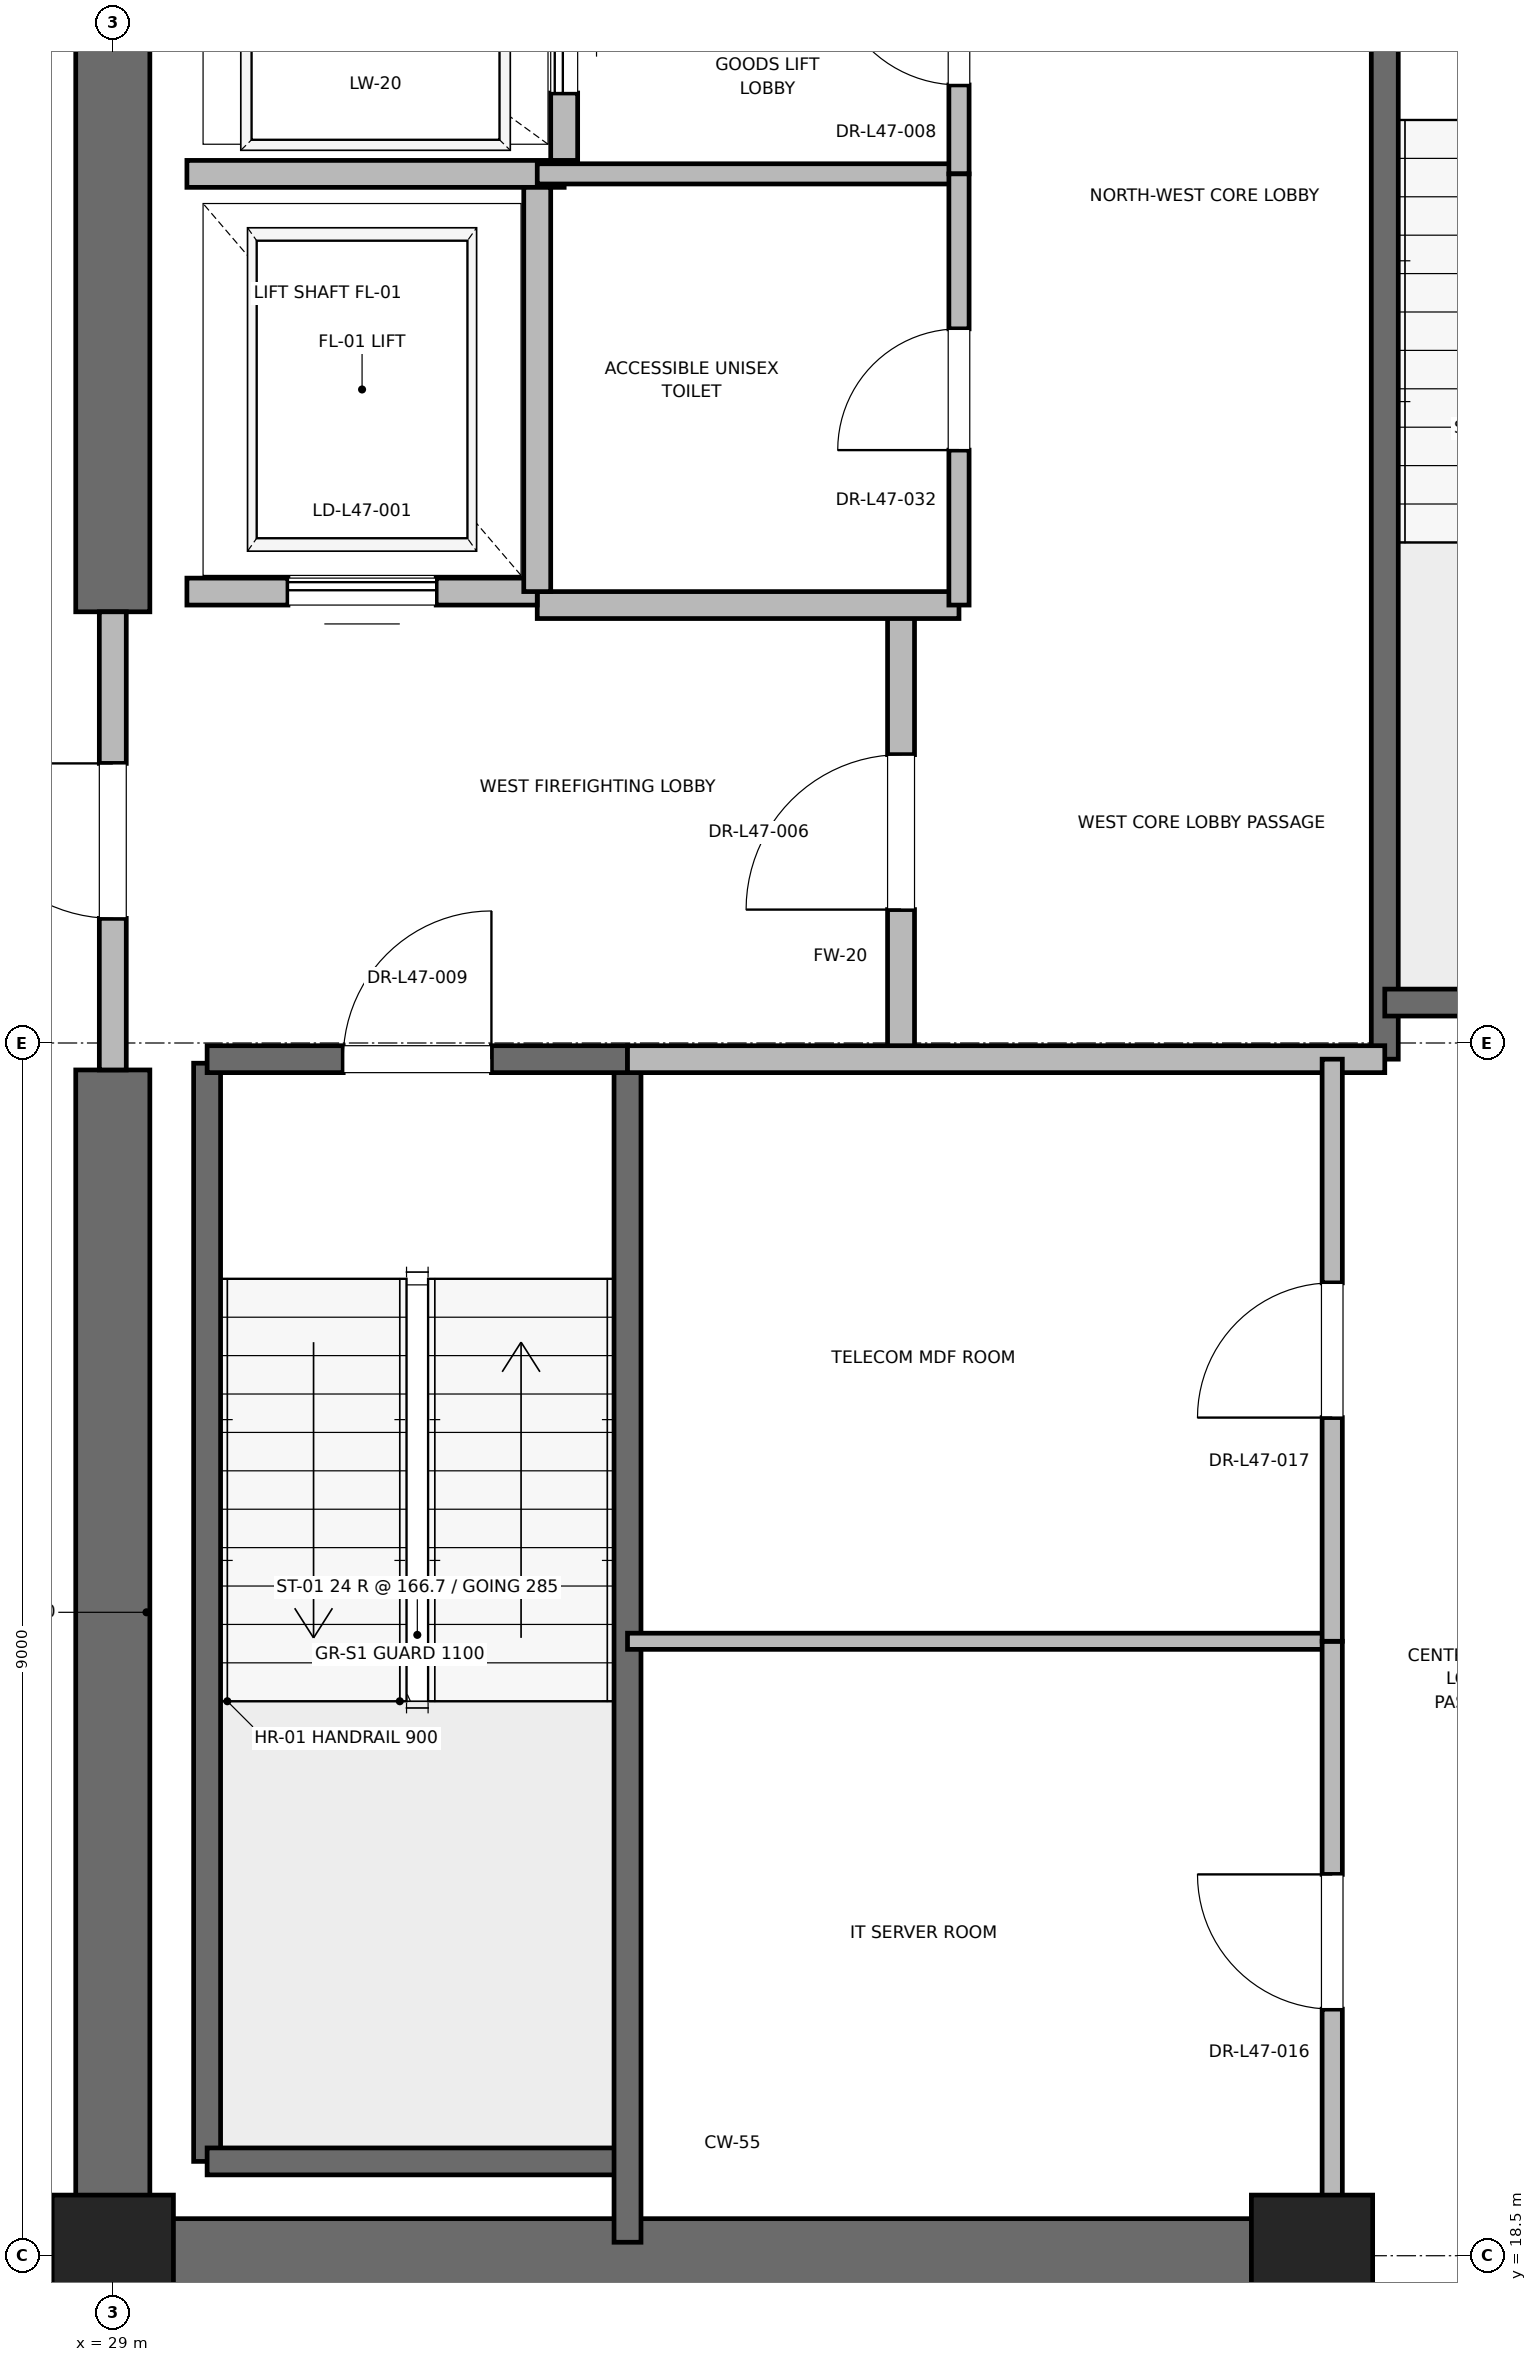
"""IFC4 building model, lengths in metres.
Left out: names, types, materials, properties, quantities, classifications, styles, units other than length and angle.
Written with IfcOpenShell. Run it as: python <this file> out.ifc"""

import sys

from ifc_helpers import new_model, si_unit, direction, frame, frame_2d, origin, origin_2d, place, context, subcontext, project, spatial, rectangle, extrude, element, fill, save


model = new_model("IFC4")
c1 = context("Model", 3, precision=1e-05, world=origin(), true_north=direction((0.0, 1.0)))
c2 = subcontext(c1, "Body", "Model", "MODEL_VIEW")
j1 = project(units=[si_unit("LENGTHUNIT", "METRE"), si_unit("PLANEANGLEUNIT", "RADIAN")], contexts=[c1])
p1 = place(None, origin())
s1 = spatial("IfcSite", under=j1, at=p1, CompositionType="ELEMENT")
p2 = place(p1, origin())
s2 = spatial("IfcBuilding", under=s1, at=p2, CompositionType="ELEMENT")
p3 = place(p2, frame((0.0, 0.0, 205.2)))
s3 = spatial("IfcBuildingStorey", under=s2, at=p3, CompositionType="ELEMENT", Elevation=205.2)
for number, where, z_axis, x_axis in (
    (1, (29.0, 18.5, 0.0), (0.0, 0.0, 1.0), (1.0, 0.0, 0.0)),
    (2, (37.9, 18.5, 0.0), (0.0, 0.0, 1.0), (1.0, 0.0, 0.0)),
):
    element("IfcColumn", number, at=place(p3, frame(where, z_axis=z_axis, x_axis=x_axis)), inside=s3, PredefinedType="PILASTER", context=c2, shape_type="SweptSolid", body=[
        extrude(rectangle(XDim=0.9, YDim=0.9, at=origin_2d()), origin(), (0.0, 0.0, 1.0), 4.0),
    ])
p4 = place(p3, frame((29.0, 18.5, 0.0), z_axis=(0.0, 0.0, 1.0), x_axis=(1.0, 0.0, 0.0)))
e3 = element("IfcWall", 3, at=p4, inside=s3, PredefinedType="SHEAR", context=c2, shape_type="SweptSolid", body=[
    extrude(rectangle(XDim=9.2, YDim=0.55, at=frame_2d((4.6, 0.0))), origin(), (0.0, 0.0, 1.0), 3.775),
])
p5 = place(p3, frame((29.0, 18.5, 0.0), z_axis=(0.0, 0.0, 1.0), x_axis=(0.0, 1.0, 0.0)))
e4 = element("IfcWall", 4, at=p5, inside=s3, PredefinedType="SHEAR", context=c2, shape_type="SweptSolid", body=[
    extrude(rectangle(XDim=8.8, YDim=0.55, at=frame_2d((4.4, 0.0))), origin(), (0.0, 0.0, 1.0), 3.775),
])
p6 = place(p3, frame((29.0, 30.7, 0.0), z_axis=(0.0, 0.0, 1.0), x_axis=(0.0, 1.0, 0.0)))
e5 = element("IfcWall", 5, at=p6, inside=s3, PredefinedType="SHEAR", context=c2, shape_type="SweptSolid", body=[
    extrude(rectangle(XDim=5.8, YDim=0.55, at=frame_2d((2.9, 0.0))), origin(), (0.0, 0.0, 1.0), 3.775),
])
p7 = place(p3, frame((29.7, 19.2, 0.0), z_axis=(0.0, 0.0, 1.0), x_axis=(0.0, 1.0, 0.0)))
e6 = element("IfcWall", 6, at=p7, inside=s3, PredefinedType="SOLIDWALL", context=c2, shape_type="SweptSolid", body=[
    extrude(rectangle(XDim=8.15, YDim=0.2, at=frame_2d((4.075, 0.0))), origin(), (0.0, 0.0, 1.0), 3.775),
])
p8 = place(p3, frame((29.7, 19.2, 0.0), z_axis=(0.0, 0.0, 1.0), x_axis=(1.0, 0.0, 0.0)))
e7 = element("IfcWall", 7, at=p8, inside=s3, PredefinedType="SOLIDWALL", context=c2, shape_type="SweptSolid", body=[
    extrude(rectangle(XDim=3.12, YDim=0.2, at=frame_2d((1.56, 0.0))), origin(), (0.0, 0.0, 1.0), 3.775),
])
p9 = place(p3, frame((32.82, 18.6, 0.0), z_axis=(0.0, 0.0, 1.0), x_axis=(0.0, 1.0, 0.0)))
e8 = element("IfcWall", 8, at=p9, inside=s3, PredefinedType="SOLIDWALL", context=c2, shape_type="SweptSolid", body=[
    extrude(rectangle(XDim=8.78, YDim=0.2, at=frame_2d((4.39, 0.0))), origin(), (0.0, 0.0, 1.0), 3.775),
])
p10 = place(p3, frame((29.7, 27.38, 0.0), z_axis=(0.0, 0.0, 1.0), x_axis=(1.0, 0.0, 0.0)))
e9 = element("IfcWall", 9, at=p10, inside=s3, PredefinedType="SOLIDWALL", context=c2, shape_type="SweptSolid", body=[
    extrude(rectangle(XDim=3.12, YDim=0.2, at=frame_2d((1.56, 0.0))), origin(), (0.0, 0.0, 1.0), 3.775),
])
p11 = place(p10, frame((1.01, 0.0, 0.0)))
e10 = element("IfcOpeningElement", 10, at=p11, cuts=e9, PredefinedType="OPENING", context=c2, shape_type="SweptSolid", body=[
    extrude(rectangle(XDim=1.1, YDim=2.15, at=frame_2d((0.55, 1.075))), frame((0.0, 0.1, 0.0), z_axis=(0.0, -1.0, 0.0), x_axis=(1.0, 0.0, 0.0)), (0.0, 0.0, 1.0), 0.2),
])
p12 = place(p3, frame((38.44, 27.38, 0.0), z_axis=(0.0, 0.0, 1.0), x_axis=(0.0, 1.0, 0.0)))
e11 = element("IfcWall", 11, at=p12, inside=s3, PredefinedType="SOLIDWALL", context=c2, shape_type="SweptSolid", body=[
    extrude(rectangle(XDim=8.87, YDim=0.2, at=frame_2d((4.435, 0.0))), origin(), (0.0, 0.0, 1.0), 3.775),
])
p13 = place(p3, frame((38.44, 27.8, 0.0), z_axis=(0.0, 0.0, 1.0), x_axis=(1.0, 0.0, 0.0)))
e12 = element("IfcWall", 12, at=p13, inside=s3, PredefinedType="SOLIDWALL", context=c2, shape_type="SweptSolid", body=[
    extrude(rectangle(XDim=3.32, YDim=0.2, at=frame_2d((1.66, 0.0))), origin(), (0.0, 0.0, 1.0), 3.775),
])
p14 = place(p3, frame((34.85, 27.38, 0.0), z_axis=(0.0, 0.0, 1.0), x_axis=(0.0, 1.0, 0.0)))
e13 = element("IfcWall", 13, at=p14, inside=s3, PredefinedType="PARTITIONING", context=c2, shape_type="SweptSolid", body=[
    extrude(rectangle(XDim=3.37, YDim=0.2, at=frame_2d((1.685, 0.0))), origin(), (0.0, 0.0, 1.0), 3.775),
])
p15 = place(p14, frame((1.11, 0.0, 0.0)))
e14 = element("IfcOpeningElement", 14, at=p15, cuts=e13, PredefinedType="OPENING", context=c2, shape_type="SweptSolid", body=[
    extrude(rectangle(XDim=1.15, YDim=2.2, at=frame_2d((0.575, 1.1))), frame((0.0, 0.1, 0.0), z_axis=(0.0, -1.0, 0.0), x_axis=(1.0, 0.0, 0.0)), (0.0, 0.0, 1.0), 0.2),
])
p16 = place(p3, frame((29.0, 27.3, 0.0), z_axis=(0.0, 0.0, 1.0), x_axis=(0.0, 1.0, 0.0)))
e15 = element("IfcWall", 15, at=p16, inside=s3, PredefinedType="PARTITIONING", context=c2, shape_type="SweptSolid", body=[
    extrude(rectangle(XDim=3.4, YDim=0.2, at=frame_2d((1.7, 0.0))), origin(), (0.0, 0.0, 1.0), 2.755),
])
p17 = place(p16, frame((1.125, 0.0, 0.0)))
e16 = element("IfcOpeningElement", 16, at=p17, cuts=e15, PredefinedType="OPENING", context=c2, shape_type="SweptSolid", body=[
    extrude(rectangle(XDim=1.15, YDim=2.2, at=frame_2d((0.575, 1.1))), frame((0.0, 0.1, 0.0), z_axis=(0.0, -1.0, 0.0), x_axis=(1.0, 0.0, 0.0)), (0.0, 0.0, 1.0), 0.2),
])
p18 = place(p3, frame((32.82, 27.38, 0.0), z_axis=(0.0, 0.0, 1.0), x_axis=(1.0, 0.0, 0.0)))
e17 = element("IfcWall", 17, at=p18, inside=s3, PredefinedType="PARTITIONING", context=c2, shape_type="SweptSolid", body=[
    extrude(rectangle(XDim=5.62, YDim=0.2, at=frame_2d((2.81, 0.0))), origin(), (0.0, 0.0, 1.0), 3.775),
])
p19 = place(p3, frame((32.15, 30.75, 0.0), z_axis=(0.0, 0.0, 1.0), x_axis=(1.0, 0.0, 0.0)))
e18 = element("IfcWall", 18, at=p19, inside=s3, PredefinedType="PARTITIONING", context=c2, shape_type="SweptSolid", body=[
    extrude(rectangle(XDim=3.13, YDim=0.2, at=frame_2d((1.565, 0.0))), origin(), (0.0, 0.0, 1.0), 3.775),
])
p20 = place(p3, frame((29.55, 30.85, 0.0), z_axis=(0.0, 0.0, 1.0), x_axis=(1.0, 0.0, 0.0)))
e19 = element("IfcWall", 19, at=p20, inside=s3, PredefinedType="SOLIDWALL", context=c2, shape_type="SweptSolid", body=[
    extrude(rectangle(XDim=2.6, YDim=0.2, at=frame_2d((1.3, 0.0))), origin(), (0.0, 0.0, 1.0), 2.755),
])
p21 = place(p20, frame((0.75, 0.0, 0.0)))
e20 = element("IfcOpeningElement", 20, at=p21, cuts=e19, PredefinedType="OPENING", context=c2, shape_type="SweptSolid", body=[
    extrude(rectangle(XDim=1.1, YDim=2.2, at=frame_2d((0.55, 1.1))), frame((0.0, 0.1, 0.0), z_axis=(0.0, -1.0, 0.0), x_axis=(1.0, 0.0, 0.0)), (0.0, 0.0, 1.0), 0.2),
])
p22 = place(p3, frame((29.55, 33.95, 0.0), z_axis=(0.0, 0.0, 1.0), x_axis=(1.0, 0.0, 0.0)))
e21 = element("IfcWall", 21, at=p22, inside=s3, PredefinedType="SOLIDWALL", context=c2, shape_type="SweptSolid", body=[
    extrude(rectangle(XDim=2.8, YDim=0.2, at=frame_2d((1.4, 0.0))), origin(), (0.0, 0.0, 1.0), 3.775),
])
p23 = place(p3, frame((32.15, 30.85, 0.0), z_axis=(0.0, 0.0, 1.0), x_axis=(0.0, 1.0, 0.0)))
e22 = element("IfcWall", 22, at=p23, inside=s3, PredefinedType="SOLIDWALL", context=c2, shape_type="SweptSolid", body=[
    extrude(rectangle(XDim=3.0, YDim=0.2, at=frame_2d((1.5, 0.0))), origin(), (0.0, 0.0, 1.0), 3.775),
])
p24 = place(p3, frame((32.35, 34.05, 0.0), z_axis=(0.0, 0.0, 1.0), x_axis=(0.0, 1.0, 0.0)))
e23 = element("IfcWall", 23, at=p24, inside=s3, PredefinedType="SOLIDWALL", context=c2, shape_type="SweptSolid", body=[
    extrude(rectangle(XDim=2.1, YDim=0.2, at=frame_2d((1.05, 0.0))), origin(), (0.0, 0.0, 1.0), 3.775),
])
p25 = place(p24, frame((0.5, 0.0, 0.0)))
e24 = element("IfcOpeningElement", 24, at=p25, cuts=e23, PredefinedType="OPENING", context=c2, shape_type="SweptSolid", body=[
    extrude(rectangle(XDim=1.1, YDim=2.2, at=frame_2d((0.55, 1.1))), frame((0.0, 0.1, 0.0), z_axis=(0.0, -1.0, 0.0), x_axis=(1.0, 0.0, 0.0)), (0.0, 0.0, 1.0), 0.2),
])
p26 = place(p3, frame((32.15, 33.95, 0.0), z_axis=(0.0, 0.0, 1.0), x_axis=(1.0, 0.0, 0.0)))
e25 = element("IfcWall", 25, at=p26, inside=s3, PredefinedType="PARTITIONING", context=c2, shape_type="SweptSolid", body=[
    extrude(rectangle(XDim=3.13, YDim=0.15, at=frame_2d((1.565, 0.0))), origin(), (0.0, 0.0, 1.0), 2.85),
])
p27 = place(p3, frame((35.28, 33.95, 0.0), z_axis=(0.0, 0.0, 1.0), x_axis=(0.0, 1.0, 0.0)))
e26 = element("IfcWall", 26, at=p27, inside=s3, PredefinedType="PARTITIONING", context=c2, shape_type="SweptSolid", body=[
    extrude(rectangle(XDim=2.27, YDim=0.15, at=frame_2d((1.135, 0.0))), origin(), (0.0, 0.0, 1.0), 2.755),
])
p28 = place(p27, frame((0.66, 0.0, 0.0)))
e27 = element("IfcOpeningElement", 27, at=p28, cuts=e26, PredefinedType="OPENING", context=c2, shape_type="SweptSolid", body=[
    extrude(rectangle(XDim=0.95, YDim=2.15, at=frame_2d((0.475, 1.075))), frame((0.0, 0.075, 0.0), z_axis=(0.0, -1.0, 0.0), x_axis=(1.0, 0.0, 0.0)), (0.0, 0.0, 1.0), 0.15),
])
p29 = place(p3, frame((35.28, 30.75, 0.0), z_axis=(0.0, 0.0, 1.0), x_axis=(0.0, 1.0, 0.0)))
e28 = element("IfcWall", 28, at=p29, inside=s3, PredefinedType="PARTITIONING", context=c2, shape_type="SweptSolid", body=[
    extrude(rectangle(XDim=3.2, YDim=0.15, at=frame_2d((1.6, 0.0))), origin(), (0.0, 0.0, 1.0), 2.85),
])
p30 = place(p29, frame((1.15, 0.0, 0.0)))
e29 = element("IfcOpeningElement", 29, at=p30, cuts=e28, PredefinedType="OPENING", context=c2, shape_type="SweptSolid", body=[
    extrude(rectangle(XDim=0.9, YDim=2.1, at=frame_2d((0.45, 1.05))), frame((0.0, 0.075, 0.0), z_axis=(0.0, -1.0, 0.0), x_axis=(1.0, 0.0, 0.0)), (0.0, 0.0, 1.0), 0.15),
])
p31 = place(p3, frame((32.82, 23.06, 0.0), z_axis=(0.0, 0.0, 1.0), x_axis=(1.0, 0.0, 0.0)))
e30 = element("IfcWall", 30, at=p31, inside=s3, PredefinedType="PARTITIONING", context=c2, shape_type="SweptSolid", body=[
    extrude(rectangle(XDim=5.23, YDim=0.12, at=frame_2d((2.615, 0.0))), origin(), (0.0, 0.0, 1.0), 2.85),
])
p32 = place(p3, frame((38.05, 18.6, 0.0), z_axis=(0.0, 0.0, 1.0), x_axis=(0.0, 1.0, 0.0)))
e31 = element("IfcWall", 31, at=p32, inside=s3, PredefinedType="PARTITIONING", context=c2, shape_type="SweptSolid", body=[
    extrude(rectangle(XDim=4.46, YDim=0.15, at=frame_2d((2.23, 0.0))), origin(), (0.0, 0.0, 1.0), 2.755),
])
p33 = place(p32, frame((1.73, 0.0, 0.0)))
e32 = element("IfcOpeningElement", 32, at=p33, cuts=e31, PredefinedType="OPENING", context=c2, shape_type="SweptSolid", body=[
    extrude(rectangle(XDim=1.0, YDim=2.15, at=frame_2d((0.5, 1.075))), frame((0.0, 0.075, 0.0), z_axis=(0.0, -1.0, 0.0), x_axis=(1.0, 0.0, 0.0)), (0.0, 0.0, 1.0), 0.15),
])
p34 = place(p3, frame((38.05, 23.06, 0.0), z_axis=(0.0, 0.0, 1.0), x_axis=(0.0, 1.0, 0.0)))
e33 = element("IfcWall", 33, at=p34, inside=s3, PredefinedType="PARTITIONING", context=c2, shape_type="SweptSolid", body=[
    extrude(rectangle(XDim=4.32, YDim=0.15, at=frame_2d((2.16, 0.0))), origin(), (0.0, 0.0, 1.0), 2.85),
])
p35 = place(p34, frame((1.66, 0.0, 0.0)))
e34 = element("IfcOpeningElement", 34, at=p35, cuts=e33, PredefinedType="OPENING", context=c2, shape_type="SweptSolid", body=[
    extrude(rectangle(XDim=1.0, YDim=2.15, at=frame_2d((0.5, 1.075))), frame((0.0, 0.075, 0.0), z_axis=(0.0, -1.0, 0.0), x_axis=(1.0, 0.0, 0.0)), (0.0, 0.0, 1.0), 0.15),
])
p36 = place(p11, origin())
e35 = element("IfcDoor", 35, at=p36, inside=s3, OperationType="SINGLE_SWING_RIGHT", PredefinedType="DOOR", context=c2, shape_type="SweptSolid", body=[
    extrude(rectangle(XDim=1.1, YDim=2.15, at=frame_2d((0.55, 1.075))), frame((0.0, 0.025, 0.0), z_axis=(0.0, -1.0, 0.0), x_axis=(1.0, 0.0, 0.0)), (0.0, 0.0, 1.0), 0.05),
])
fill(e10, e35)
p37 = place(p15, origin())
e36 = element("IfcDoor", 36, at=p37, inside=s3, OperationType="SINGLE_SWING_LEFT", PredefinedType="DOOR", context=c2, shape_type="SweptSolid", body=[
    extrude(rectangle(XDim=1.15, YDim=2.2, at=frame_2d((0.575, 1.1))), frame((0.0, 0.025, 0.0), z_axis=(0.0, -1.0, 0.0), x_axis=(1.0, 0.0, 0.0)), (0.0, 0.0, 1.0), 0.05),
])
fill(e14, e36)
p38 = place(p17, origin())
e37 = element("IfcDoor", 37, at=p38, inside=s3, OperationType="SINGLE_SWING_RIGHT", PredefinedType="DOOR", context=c2, shape_type="SweptSolid", body=[
    extrude(rectangle(XDim=1.15, YDim=2.2, at=frame_2d((0.575, 1.1))), frame((0.0, 0.025, 0.0), z_axis=(0.0, -1.0, 0.0), x_axis=(1.0, 0.0, 0.0)), (0.0, 0.0, 1.0), 0.05),
])
fill(e16, e37)
p39 = place(p21, origin())
e38 = element("IfcDoor", 38, at=p39, inside=s3, OperationType="SLIDING_TO_RIGHT", PredefinedType="DOOR", context=c2, shape_type="SweptSolid", body=[
    extrude(rectangle(XDim=1.1, YDim=2.2, at=frame_2d((0.55, 1.1))), frame((0.0, 0.025, 0.0), z_axis=(0.0, -1.0, 0.0), x_axis=(1.0, 0.0, 0.0)), (0.0, 0.0, 1.0), 0.05),
])
fill(e20, e38)
p40 = place(p25, origin())
e39 = element("IfcDoor", 39, at=p40, inside=s3, OperationType="SLIDING_TO_RIGHT", PredefinedType="DOOR", context=c2, shape_type="SweptSolid", body=[
    extrude(rectangle(XDim=1.1, YDim=2.2, at=frame_2d((0.55, 1.1))), frame((0.0, 0.025, 0.0), z_axis=(0.0, -1.0, 0.0), x_axis=(1.0, 0.0, 0.0)), (0.0, 0.0, 1.0), 0.05),
])
fill(e24, e39)
p41 = place(p28, origin())
e40 = element("IfcDoor", 40, at=p41, inside=s3, OperationType="SINGLE_SWING_RIGHT", PredefinedType="DOOR", context=c2, shape_type="SweptSolid", body=[
    extrude(rectangle(XDim=0.95, YDim=2.15, at=frame_2d((0.475, 1.075))), frame((0.0, 0.025, 0.0), z_axis=(0.0, -1.0, 0.0), x_axis=(1.0, 0.0, 0.0)), (0.0, 0.0, 1.0), 0.05),
])
fill(e27, e40)
p42 = place(p30, origin())
e41 = element("IfcDoor", 41, at=p42, inside=s3, OperationType="SINGLE_SWING_LEFT", PredefinedType="DOOR", context=c2, shape_type="SweptSolid", body=[
    extrude(rectangle(XDim=0.9, YDim=2.1, at=frame_2d((0.45, 1.05))), frame((0.0, 0.025, 0.0), z_axis=(0.0, -1.0, 0.0), x_axis=(1.0, 0.0, 0.0)), (0.0, 0.0, 1.0), 0.05),
])
fill(e29, e41)
p43 = place(p33, origin())
e42 = element("IfcDoor", 42, at=p43, inside=s3, OperationType="SINGLE_SWING_RIGHT", PredefinedType="DOOR", context=c2, shape_type="SweptSolid", body=[
    extrude(rectangle(XDim=1.0, YDim=2.15, at=frame_2d((0.5, 1.075))), frame((0.0, 0.025, 0.0), z_axis=(0.0, -1.0, 0.0), x_axis=(1.0, 0.0, 0.0)), (0.0, 0.0, 1.0), 0.05),
])
fill(e32, e42)
p44 = place(p35, origin())
e43 = element("IfcDoor", 43, at=p44, inside=s3, OperationType="SINGLE_SWING_LEFT", PredefinedType="DOOR", context=c2, shape_type="SweptSolid", body=[
    extrude(rectangle(XDim=1.0, YDim=2.15, at=frame_2d((0.5, 1.075))), frame((0.0, 0.025, 0.0), z_axis=(0.0, -1.0, 0.0), x_axis=(1.0, 0.0, 0.0)), (0.0, 0.0, 1.0), 0.05),
])
fill(e34, e43)
save(model, sys.argv[1])
